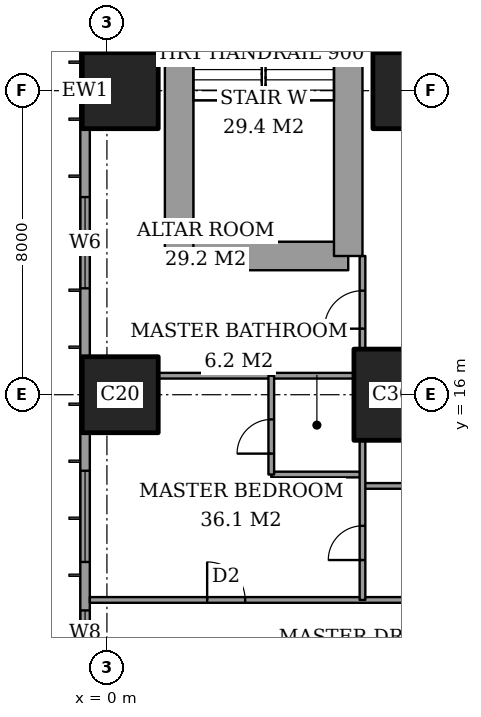
"""IFC4 building model, lengths in metres.
Left out: names, types, materials, properties, quantities, classifications, styles, units other than length and angle.
Written with IfcOpenShell. Run it as: python <this file> out.ifc"""

import sys

from ifc_helpers import new_model, si_unit, direction, frame, frame_2d, origin, origin_2d, place, context, subcontext, project, spatial, rectangle, extrude, element, fill, save


model = new_model("IFC4")
c1 = context("Model", 3, precision=1e-05, world=origin(), true_north=direction((0.0, 1.0)))
c2 = subcontext(c1, "Body", "Model", "MODEL_VIEW")
j1 = project(units=[si_unit("LENGTHUNIT", "METRE"), si_unit("PLANEANGLEUNIT", "RADIAN")], contexts=[c1])
p1 = place(None, origin())
s1 = spatial("IfcSite", under=j1, at=p1, CompositionType="ELEMENT")
p2 = place(p1, origin())
s2 = spatial("IfcBuilding", under=s1, at=p2, CompositionType="ELEMENT")
p3 = place(p2, frame((0.0, 0.0, 87.2)))
s3 = spatial("IfcBuildingStorey", under=s2, at=p3, CompositionType="ELEMENT", Elevation=87.2)
for number, where, z_axis, x_axis in (
    (1, (0.35, 16.0, 0.0), (0.0, 0.0, 1.0), (1.0, 0.0, 0.0)),
    (2, (0.35, 24.0, 0.0), (0.0, 0.0, 1.0), (1.0, 0.0, 0.0)),
):
    element("IfcColumn", number, at=place(p3, frame(where, z_axis=z_axis, x_axis=x_axis)), inside=s3, PredefinedType="COLUMN", context=c2, shape_type="SweptSolid", body=[
        extrude(rectangle(XDim=2.0, YDim=2.0, at=origin_2d()), origin(), (0.0, 0.0, 1.0), 3.6),
    ])
p4 = place(p3, frame((8.0, 16.0, 0.0), z_axis=(0.0, 0.0, 1.0), x_axis=(1.0, 0.0, 0.0)))
e3 = element("IfcColumn", 3, at=p4, inside=s3, PredefinedType="COLUMN", context=c2, shape_type="SweptSolid", body=[
    extrude(rectangle(XDim=3.0, YDim=2.4, at=origin_2d()), origin(), (0.0, 0.0, 1.0), 3.6),
])
p5 = place(p3, frame((8.0, 24.0, 0.0), z_axis=(0.0, 0.0, 1.0), x_axis=(1.0, 0.0, 0.0)))
e4 = element("IfcColumn", 4, at=p5, inside=s3, PredefinedType="COLUMN", context=c2, shape_type="SweptSolid", body=[
    extrude(rectangle(XDim=2.0, YDim=2.0, at=origin_2d()), origin(), (0.0, 0.0, 1.0), 3.6),
])
p6 = place(p3, frame((1.9, 19.65, 0.0), z_axis=(0.0, 0.0, 1.0), x_axis=(1.0, 0.0, 0.0)))
e5 = element("IfcWall", 5, at=p6, inside=s3, PredefinedType="SHEAR", context=c2, shape_type="SweptSolid", body=[
    extrude(rectangle(XDim=4.45, YDim=0.75, at=frame_2d((2.225, 0.0))), origin(), (0.0, 0.0, 1.0), 3.6),
])
p7 = place(p3, frame((6.35, 19.65, 0.0), z_axis=(0.0, 0.0, 1.0), x_axis=(0.0, 1.0, 0.0)))
e6 = element("IfcWall", 6, at=p7, inside=s3, PredefinedType="SHEAR", context=c2, shape_type="SweptSolid", body=[
    extrude(rectangle(XDim=8.7, YDim=0.75, at=frame_2d((4.35, 0.0))), origin(), (0.0, 0.0, 1.0), 3.6),
])
p8 = place(p7, frame((6.725, 0.0, 0.0)))
e7 = element("IfcOpeningElement", 7, at=p8, cuts=e6, PredefinedType="OPENING", context=c2, shape_type="SweptSolid", body=[
    extrude(rectangle(XDim=1.0, YDim=2.1, at=frame_2d((0.5, 1.05))), frame((0.0, 0.385, 0.0), z_axis=(0.0, -1.0, 0.0), x_axis=(1.0, 0.0, 0.0)), (0.0, 0.0, 1.0), 0.77),
])
p9 = place(p3, frame((1.9, 28.35, 0.0), z_axis=(0.0, 0.0, 1.0), x_axis=(0.0, -1.0, 0.0)))
e8 = element("IfcWall", 8, at=p9, inside=s3, PredefinedType="SHEAR", context=c2, shape_type="SweptSolid", body=[
    extrude(rectangle(XDim=8.7, YDim=0.75, at=frame_2d((4.35, 0.0))), origin(), (0.0, 0.0, 1.0), 3.6),
])
p10 = place(p3, frame((-0.575, 44.825, 0.0), z_axis=(0.0, 0.0, 1.0), x_axis=(0.0, -1.0, 0.0)))
e9 = element("IfcWall", 9, at=p10, inside=s3, PredefinedType="SOLIDWALL", context=c2, shape_type="SweptSolid", body=[
    extrude(rectangle(XDim=41.65, YDim=0.25, at=frame_2d((20.825, 0.0))), origin(), (0.0, 0.0, 1.0), 3.6),
])
p11 = place(p10, frame((0.775, 0.0, 0.6)))
e10 = element("IfcOpeningElement", 10, at=p11, cuts=e9, PredefinedType="OPENING", context=c2, shape_type="SweptSolid", body=[
    extrude(rectangle(XDim=2.4, YDim=2.0, at=frame_2d((1.2, 1.0))), frame((0.0, 0.135, 0.0), z_axis=(0.0, -1.0, 0.0), x_axis=(1.0, 0.0, 0.0)), (0.0, 0.0, 1.0), 0.27),
])
p12 = place(p10, frame((6.1, 0.0, 0.6)))
e11 = element("IfcOpeningElement", 11, at=p12, cuts=e9, PredefinedType="OPENING", context=c2, shape_type="SweptSolid", body=[
    extrude(rectangle(XDim=1.2, YDim=2.0, at=frame_2d((0.6, 1.0))), frame((0.0, 0.135, 0.0), z_axis=(0.0, -1.0, 0.0), x_axis=(1.0, 0.0, 0.0)), (0.0, 0.0, 1.0), 0.27),
])
p13 = place(p10, frame((8.425, 0.0, 0.6)))
e12 = element("IfcOpeningElement", 12, at=p13, cuts=e9, PredefinedType="OPENING", context=c2, shape_type="SweptSolid", body=[
    extrude(rectangle(XDim=2.4, YDim=2.0, at=frame_2d((1.2, 1.0))), frame((0.0, 0.135, 0.0), z_axis=(0.0, -1.0, 0.0), x_axis=(1.0, 0.0, 0.0)), (0.0, 0.0, 1.0), 0.27),
])
p14 = place(p10, frame((15.625, 0.0, 0.6)))
e13 = element("IfcOpeningElement", 13, at=p14, cuts=e9, PredefinedType="OPENING", context=c2, shape_type="SweptSolid", body=[
    extrude(rectangle(XDim=2.4, YDim=2.0, at=frame_2d((1.2, 1.0))), frame((0.0, 0.135, 0.0), z_axis=(0.0, -1.0, 0.0), x_axis=(1.0, 0.0, 0.0)), (0.0, 0.0, 1.0), 0.27),
])
p15 = place(p10, frame((23.625, 0.0, 0.6)))
e14 = element("IfcOpeningElement", 14, at=p15, cuts=e9, PredefinedType="OPENING", context=c2, shape_type="SweptSolid", body=[
    extrude(rectangle(XDim=2.4, YDim=2.0, at=frame_2d((1.2, 1.0))), frame((0.0, 0.135, 0.0), z_axis=(0.0, -1.0, 0.0), x_axis=(1.0, 0.0, 0.0)), (0.0, 0.0, 1.0), 0.27),
])
p16 = place(p10, frame((30.825, 0.0, 0.6)))
e15 = element("IfcOpeningElement", 15, at=p16, cuts=e9, PredefinedType="OPENING", context=c2, shape_type="SweptSolid", body=[
    extrude(rectangle(XDim=2.4, YDim=2.0, at=frame_2d((1.2, 1.0))), frame((0.0, 0.135, 0.0), z_axis=(0.0, -1.0, 0.0), x_axis=(1.0, 0.0, 0.0)), (0.0, 0.0, 1.0), 0.27),
])
p17 = place(p10, frame((34.5, 0.0, 0.6)))
e16 = element("IfcOpeningElement", 16, at=p17, cuts=e9, PredefinedType="OPENING", context=c2, shape_type="SweptSolid", body=[
    extrude(rectangle(XDim=1.2, YDim=2.0, at=frame_2d((0.6, 1.0))), frame((0.0, 0.135, 0.0), z_axis=(0.0, -1.0, 0.0), x_axis=(1.0, 0.0, 0.0)), (0.0, 0.0, 1.0), 0.27),
])
p18 = place(p10, frame((38.475, 0.0, 0.6)))
e17 = element("IfcOpeningElement", 17, at=p18, cuts=e9, PredefinedType="OPENING", context=c2, shape_type="SweptSolid", body=[
    extrude(rectangle(XDim=2.4, YDim=2.0, at=frame_2d((1.2, 1.0))), frame((0.0, 0.135, 0.0), z_axis=(0.0, -1.0, 0.0), x_axis=(1.0, 0.0, 0.0)), (0.0, 0.0, 1.0), 0.27),
])
p19 = place(p3, frame((-0.45, 10.6, 0.0), z_axis=(0.0, 0.0, 1.0), x_axis=(1.0, 0.0, 0.0)))
e18 = element("IfcWall", 18, at=p19, inside=s3, PredefinedType="PARTITIONING", context=c2, shape_type="SweptSolid", body=[
    extrude(rectangle(XDim=25.011, YDim=0.15, at=frame_2d((12.505, 0.0))), origin(), (0.0, 0.0, 1.0), 3.25),
])
p20 = place(p19, frame((10.65, 0.0, 0.0)))
e19 = element("IfcOpeningElement", 19, at=p20, cuts=e18, PredefinedType="OPENING", context=c2, shape_type="SweptSolid", body=[
    extrude(rectangle(XDim=1.0, YDim=2.1, at=frame_2d((0.5, 1.05))), frame((0.0, 0.085, 0.0), z_axis=(0.0, -1.0, 0.0), x_axis=(1.0, 0.0, 0.0)), (0.0, 0.0, 1.0), 0.17),
])
p21 = place(p19, frame((3.087, 0.0, 0.0)))
e20 = element("IfcOpeningElement", 20, at=p21, cuts=e18, PredefinedType="OPENING", context=c2, shape_type="SweptSolid", body=[
    extrude(rectangle(XDim=1.0, YDim=2.1, at=frame_2d((0.5, 1.05))), frame((0.0, 0.085, 0.0), z_axis=(0.0, -1.0, 0.0), x_axis=(1.0, 0.0, 0.0)), (0.0, 0.0, 1.0), 0.17),
])
p22 = place(p19, frame((13.45, 0.0, 0.0)))
e21 = element("IfcOpeningElement", 21, at=p22, cuts=e18, PredefinedType="OPENING", context=c2, shape_type="SweptSolid", body=[
    extrude(rectangle(XDim=1.0, YDim=2.1, at=frame_2d((0.5, 1.05))), frame((0.0, 0.085, 0.0), z_axis=(0.0, -1.0, 0.0), x_axis=(1.0, 0.0, 0.0)), (0.0, 0.0, 1.0), 0.17),
])
p23 = place(p19, frame((16.55, 0.0, 0.0)))
e22 = element("IfcOpeningElement", 22, at=p23, cuts=e18, PredefinedType="OPENING", context=c2, shape_type="SweptSolid", body=[
    extrude(rectangle(XDim=1.0, YDim=2.1, at=frame_2d((0.5, 1.05))), frame((0.0, 0.085, 0.0), z_axis=(0.0, -1.0, 0.0), x_axis=(1.0, 0.0, 0.0)), (0.0, 0.0, 1.0), 0.17),
])
p24 = place(p19, frame((21.175, 0.0, 0.0)))
e23 = element("IfcOpeningElement", 23, at=p24, cuts=e18, PredefinedType="OPENING", context=c2, shape_type="SweptSolid", body=[
    extrude(rectangle(XDim=1.0, YDim=2.1, at=frame_2d((0.5, 1.05))), frame((0.0, 0.085, 0.0), z_axis=(0.0, -1.0, 0.0), x_axis=(1.0, 0.0, 0.0)), (0.0, 0.0, 1.0), 0.17),
])
p25 = place(p3, frame((6.725, 13.6, 0.0), z_axis=(0.0, 0.0, 1.0), x_axis=(1.0, 0.0, 0.0)))
e24 = element("IfcWall", 24, at=p25, inside=s3, PredefinedType="PARTITIONING", context=c2, shape_type="SweptSolid", body=[
    extrude(rectangle(XDim=2.875, YDim=0.15, at=frame_2d((1.438, 0.0))), origin(), (0.0, 0.0, 1.0), 3.25),
])
p26 = place(p3, frame((4.325, 13.9, 0.0), z_axis=(0.0, 0.0, 1.0), x_axis=(1.0, 0.0, 0.0)))
e25 = element("IfcWall", 25, at=p26, inside=s3, PredefinedType="PARTITIONING", context=c2, shape_type="SweptSolid", body=[
    extrude(rectangle(XDim=2.4, YDim=0.15, at=frame_2d((1.2, 0.0))), origin(), (0.0, 0.0, 1.0), 3.25),
])
p27 = place(p3, frame((1.35, 16.5, 0.0), z_axis=(0.0, 0.0, 1.0), x_axis=(1.0, 0.0, 0.0)))
e26 = element("IfcWall", 26, at=p27, inside=s3, PredefinedType="PARTITIONING", context=c2, shape_type="SweptSolid", body=[
    extrude(rectangle(XDim=5.15, YDim=0.15, at=frame_2d((2.575, 0.0))), origin(), (0.0, 0.0, 1.0), 3.25),
])
p28 = place(p3, frame((4.325, 13.9, 0.0), z_axis=(0.0, 0.0, 1.0), x_axis=(0.0, 1.0, 0.0)))
e27 = element("IfcWall", 27, at=p28, inside=s3, PredefinedType="PARTITIONING", context=c2, shape_type="SweptSolid", body=[
    extrude(rectangle(XDim=2.6, YDim=0.15, at=frame_2d((1.3, 0.0))), origin(), (0.0, 0.0, 1.0), 3.25),
])
p29 = place(p28, frame((0.55, 0.0, 0.0)))
e28 = element("IfcOpeningElement", 28, at=p29, cuts=e27, PredefinedType="OPENING", context=c2, shape_type="SweptSolid", body=[
    extrude(rectangle(XDim=0.9, YDim=2.1, at=frame_2d((0.45, 1.05))), frame((0.0, 0.085, 0.0), z_axis=(0.0, -1.0, 0.0), x_axis=(1.0, 0.0, 0.0)), (0.0, 0.0, 1.0), 0.17),
])
p30 = place(p3, frame((6.725, 10.6, 0.0), z_axis=(0.0, 0.0, 1.0), x_axis=(0.0, 1.0, 0.0)))
e29 = element("IfcWall", 29, at=p30, inside=s3, PredefinedType="PARTITIONING", context=c2, shape_type="SweptSolid", body=[
    extrude(rectangle(XDim=4.2, YDim=0.15, at=frame_2d((2.1, 0.0))), origin(), (0.0, 0.0, 1.0), 3.25),
])
p31 = place(p30, frame((1.05, 0.0, 0.0)))
e30 = element("IfcOpeningElement", 30, at=p31, cuts=e29, PredefinedType="OPENING", context=c2, shape_type="SweptSolid", body=[
    extrude(rectangle(XDim=0.9, YDim=2.1, at=frame_2d((0.45, 1.05))), frame((0.0, 0.085, 0.0), z_axis=(0.0, -1.0, 0.0), x_axis=(1.0, 0.0, 0.0)), (0.0, 0.0, 1.0), 0.17),
])
p32 = place(p3, frame((6.725, 17.2, 0.0), z_axis=(0.0, 0.0, 1.0), x_axis=(0.0, 1.0, 0.0)))
e31 = element("IfcWall", 31, at=p32, inside=s3, PredefinedType="PARTITIONING", context=c2, shape_type="SweptSolid", body=[
    extrude(rectangle(XDim=2.45, YDim=0.15, at=frame_2d((1.225, 0.0))), origin(), (0.0, 0.0, 1.0), 3.25),
])
p33 = place(p32, frame((0.538, 0.0, 0.0)))
e32 = element("IfcOpeningElement", 32, at=p33, cuts=e31, PredefinedType="OPENING", context=c2, shape_type="SweptSolid", body=[
    extrude(rectangle(XDim=1.0, YDim=2.1, at=frame_2d((0.5, 1.05))), frame((0.0, 0.085, 0.0), z_axis=(0.0, -1.0, 0.0), x_axis=(1.0, 0.0, 0.0)), (0.0, 0.0, 1.0), 0.17),
])
p34 = place(p15, origin())
e33 = element("IfcWindow", 33, at=p34, inside=s3, PartitioningType="SINGLE_PANEL", PredefinedType="WINDOW", context=c2, shape_type="SweptSolid", body=[
    extrude(rectangle(XDim=2.4, YDim=2.0, at=frame_2d((1.2, 1.0))), frame((0.0, 0.03, 0.0), z_axis=(0.0, -1.0, 0.0), x_axis=(1.0, 0.0, 0.0)), (0.0, 0.0, 1.0), 0.06),
])
fill(e14, e33)
p35 = place(p16, origin())
e34 = element("IfcWindow", 34, at=p35, inside=s3, PartitioningType="SINGLE_PANEL", PredefinedType="WINDOW", context=c2, shape_type="SweptSolid", body=[
    extrude(rectangle(XDim=2.4, YDim=2.0, at=frame_2d((1.2, 1.0))), frame((0.0, 0.03, 0.0), z_axis=(0.0, -1.0, 0.0), x_axis=(1.0, 0.0, 0.0)), (0.0, 0.0, 1.0), 0.06),
])
fill(e15, e34)
p36 = place(p17, origin())
e35 = element("IfcWindow", 35, at=p36, inside=s3, PartitioningType="SINGLE_PANEL", PredefinedType="WINDOW", context=c2, shape_type="SweptSolid", body=[
    extrude(rectangle(XDim=1.2, YDim=2.0, at=frame_2d((0.6, 1.0))), frame((0.0, 0.03, 0.0), z_axis=(0.0, -1.0, 0.0), x_axis=(1.0, 0.0, 0.0)), (0.0, 0.0, 1.0), 0.06),
])
fill(e16, e35)
p37 = place(p29, origin())
e36 = element("IfcDoor", 36, at=p37, inside=s3, OperationType="SINGLE_SWING_RIGHT", PredefinedType="DOOR", context=c2, shape_type="SweptSolid", body=[
    extrude(rectangle(XDim=0.9, YDim=2.1, at=frame_2d((0.45, 1.05))), frame((0.0, 0.025, 0.0), z_axis=(0.0, -1.0, 0.0), x_axis=(1.0, 0.0, 0.0)), (0.0, 0.0, 1.0), 0.05),
])
fill(e28, e36)
p38 = place(p21, origin())
e37 = element("IfcDoor", 37, at=p38, inside=s3, OperationType="SINGLE_SWING_RIGHT", PredefinedType="DOOR", context=c2, shape_type="SweptSolid", body=[
    extrude(rectangle(XDim=1.0, YDim=2.1, at=frame_2d((0.5, 1.05))), frame((0.0, 0.025, 0.0), z_axis=(0.0, -1.0, 0.0), x_axis=(1.0, 0.0, 0.0)), (0.0, 0.0, 1.0), 0.05),
])
fill(e20, e37)
p39 = place(p33, origin())
e38 = element("IfcDoor", 38, at=p39, inside=s3, OperationType="SINGLE_SWING_RIGHT", PredefinedType="DOOR", context=c2, shape_type="SweptSolid", body=[
    extrude(rectangle(XDim=1.0, YDim=2.1, at=frame_2d((0.5, 1.05))), frame((0.0, 0.025, 0.0), z_axis=(0.0, -1.0, 0.0), x_axis=(1.0, 0.0, 0.0)), (0.0, 0.0, 1.0), 0.05),
])
fill(e32, e38)
p40 = place(p31, origin())
e39 = element("IfcDoor", 39, at=p40, inside=s3, OperationType="SINGLE_SWING_RIGHT", PredefinedType="DOOR", context=c2, shape_type="SweptSolid", body=[
    extrude(rectangle(XDim=0.9, YDim=2.1, at=frame_2d((0.45, 1.05))), frame((0.0, 0.025, 0.0), z_axis=(0.0, -1.0, 0.0), x_axis=(1.0, 0.0, 0.0)), (0.0, 0.0, 1.0), 0.05),
])
fill(e30, e39)
save(model, sys.argv[1])
